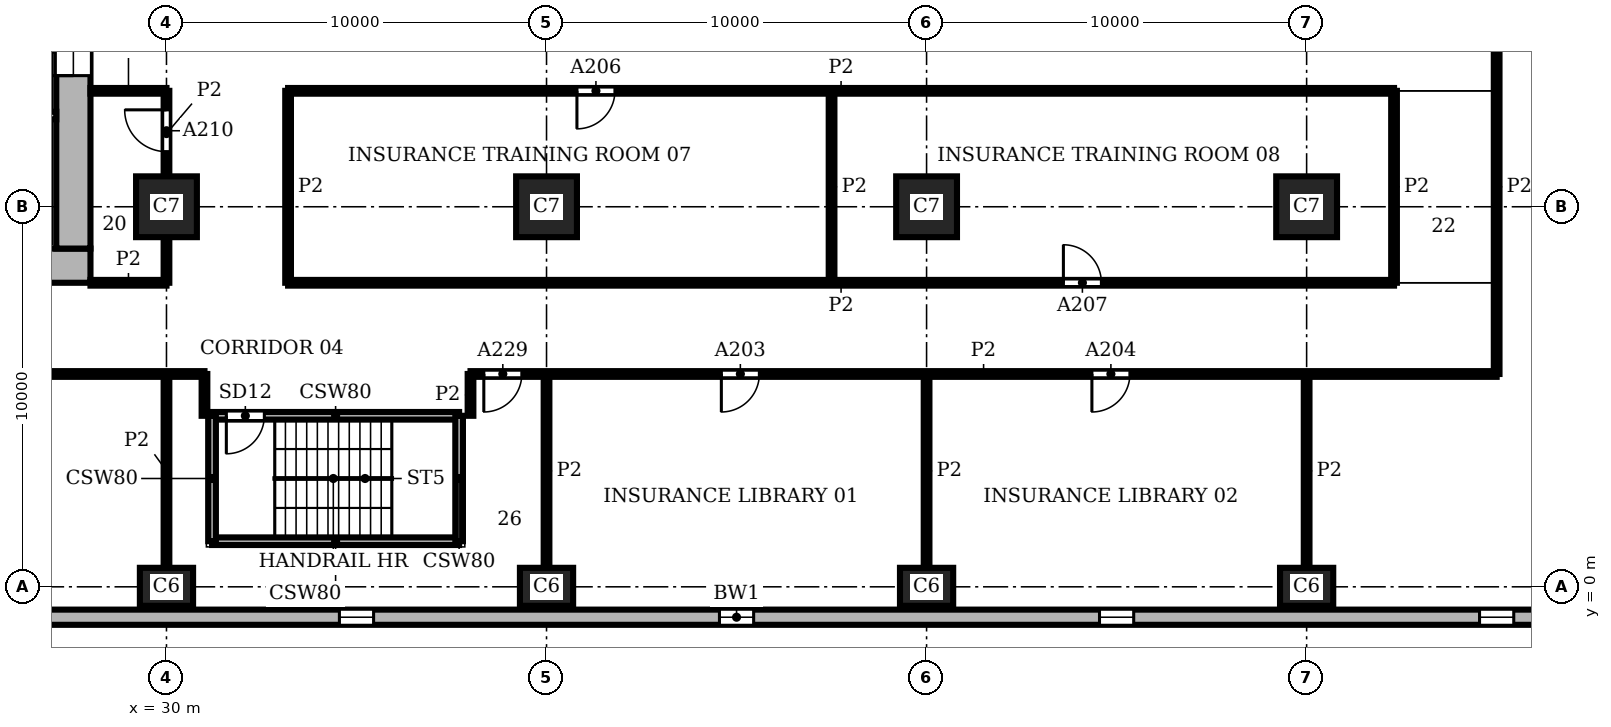
"""IFC4 building model, lengths in metres.
Left out: names, types, materials, properties, quantities, classifications, styles, units other than length and angle.
Written with IfcOpenShell. Run it as: python <this file> out.ifc"""

import sys

from ifc_helpers import new_model, si_unit, direction, frame, frame_2d, origin, origin_2d, place, context, subcontext, project, spatial, rectangle, extrude, element, fill, save


model = new_model("IFC4")
c1 = context("Model", 3, precision=1e-05, world=origin(), true_north=direction((0.0, 1.0)))
c2 = subcontext(c1, "Body", "Model", "MODEL_VIEW")
j1 = project(units=[si_unit("LENGTHUNIT", "METRE"), si_unit("PLANEANGLEUNIT", "RADIAN")], contexts=[c1])
p1 = place(None, origin())
s1 = spatial("IfcSite", under=j1, at=p1, CompositionType="ELEMENT")
p2 = place(p1, origin())
s2 = spatial("IfcBuilding", under=s1, at=p2, CompositionType="ELEMENT")
p3 = place(p2, frame((0.0, 0.0, 23.7)))
s3 = spatial("IfcBuildingStorey", under=s2, at=p3, CompositionType="ELEMENT", Elevation=23.7)
for number, where, z_axis, x_axis in (
    (1, (30.0, 0.0, 0.0), (0.0, 0.0, 1.0), (1.0, 0.0, 0.0)),
    (2, (40.0, 0.0, 0.0), (0.0, 0.0, 1.0), (1.0, 0.0, 0.0)),
    (3, (50.0, 0.0, 0.0), (0.0, 0.0, 1.0), (1.0, 0.0, 0.0)),
    (4, (60.0, 0.0, 0.0), (0.0, 0.0, 1.0), (1.0, 0.0, 0.0)),
):
    element("IfcColumn", number, at=place(p3, frame(where, z_axis=z_axis, x_axis=x_axis)), inside=s3, PredefinedType="COLUMN", context=c2, shape_type="SweptSolid", body=[
        extrude(rectangle(XDim=1.4, YDim=1.0, at=origin_2d()), origin(), (0.0, 0.0, 1.0), 3.9),
    ])
for number, where, z_axis, x_axis in (
    (5, (30.0, 10.0, 0.0), (0.0, 0.0, 1.0), (1.0, 0.0, 0.0)),
    (6, (40.0, 10.0, 0.0), (0.0, 0.0, 1.0), (1.0, 0.0, 0.0)),
    (7, (50.0, 10.0, 0.0), (0.0, 0.0, 1.0), (1.0, 0.0, 0.0)),
    (8, (60.0, 10.0, 0.0), (0.0, 0.0, 1.0), (1.0, 0.0, 0.0)),
):
    element("IfcColumn", number, at=place(p3, frame(where, z_axis=z_axis, x_axis=x_axis)), inside=s3, PredefinedType="COLUMN", context=c2, shape_type="SweptSolid", body=[
        extrude(rectangle(XDim=1.6, YDim=1.6, at=origin_2d()), origin(), (0.0, 0.0, 1.0), 3.9),
    ])
p4 = place(p3, frame((8.0, 8.45, 0.0), z_axis=(0.0, 0.0, 1.0), x_axis=(1.0, 0.0, 0.0)))
e9 = element("IfcWall", 9, at=p4, inside=s3, PredefinedType="SHEAR", context=c2, shape_type="SweptSolid", body=[
    extrude(rectangle(XDim=20.0, YDim=0.9, at=frame_2d((10.0, 0.0))), origin(), (0.0, 0.0, 1.0), 3.9),
])
p5 = place(p3, frame((27.55, 8.9, 0.0), z_axis=(0.0, 0.0, 1.0), x_axis=(0.0, 1.0, 0.0)))
e10 = element("IfcWall", 10, at=p5, inside=s3, PredefinedType="SHEAR", context=c2, shape_type="SweptSolid", body=[
    extrude(rectangle(XDim=18.2, YDim=0.9, at=frame_2d((9.1, 0.0))), origin(), (0.0, 0.0, 1.0), 3.9),
])
p6 = place(p5, frame((4.55, 0.0, 0.0)))
e11 = element("IfcOpeningElement", 11, at=p6, cuts=e10, PredefinedType="OPENING", context=c2, shape_type="SweptSolid", body=[
    extrude(rectangle(XDim=1.6, YDim=2.1, at=frame_2d((0.8, 1.05))), frame((0.0, 0.46, 0.0), z_axis=(0.0, -1.0, 0.0), x_axis=(1.0, 0.0, 0.0)), (0.0, 0.0, 1.0), 0.92),
])
p7 = place(p3, frame((20.8, -0.8, 0.0), z_axis=(0.0, 0.0, 1.0), x_axis=(1.0, 0.0, 0.0)))
e12 = element("IfcWall", 12, at=p7, inside=s3, PredefinedType="SOLIDWALL", context=c2, shape_type="SweptSolid", body=[
    extrude(rectangle(XDim=48.4, YDim=0.4, at=frame_2d((24.2, 0.0))), origin(), (0.0, 0.0, 1.0), 3.9),
])
p8 = place(p7, frame((3.75, 0.0, 0.9)))
e13 = element("IfcOpeningElement", 13, at=p8, cuts=e12, PredefinedType="OPENING", context=c2, shape_type="SweptSolid", body=[
    extrude(rectangle(XDim=0.9, YDim=2.35, at=frame_2d((0.45, 1.175))), frame((0.0, 0.21, 0.0), z_axis=(0.0, -1.0, 0.0), x_axis=(1.0, 0.0, 0.0)), (0.0, 0.0, 1.0), 0.42),
])
p9 = place(p7, frame((13.75, 0.0, 0.9)))
e14 = element("IfcOpeningElement", 14, at=p9, cuts=e12, PredefinedType="OPENING", context=c2, shape_type="SweptSolid", body=[
    extrude(rectangle(XDim=0.9, YDim=2.35, at=frame_2d((0.45, 1.175))), frame((0.0, 0.21, 0.0), z_axis=(0.0, -1.0, 0.0), x_axis=(1.0, 0.0, 0.0)), (0.0, 0.0, 1.0), 0.42),
])
p10 = place(p7, frame((23.75, 0.0, 0.9)))
e15 = element("IfcOpeningElement", 15, at=p10, cuts=e12, PredefinedType="OPENING", context=c2, shape_type="SweptSolid", body=[
    extrude(rectangle(XDim=0.9, YDim=2.35, at=frame_2d((0.45, 1.175))), frame((0.0, 0.21, 0.0), z_axis=(0.0, -1.0, 0.0), x_axis=(1.0, 0.0, 0.0)), (0.0, 0.0, 1.0), 0.42),
])
p11 = place(p7, frame((33.75, 0.0, 0.9)))
e16 = element("IfcOpeningElement", 16, at=p11, cuts=e12, PredefinedType="OPENING", context=c2, shape_type="SweptSolid", body=[
    extrude(rectangle(XDim=0.9, YDim=2.35, at=frame_2d((0.45, 1.175))), frame((0.0, 0.21, 0.0), z_axis=(0.0, -1.0, 0.0), x_axis=(1.0, 0.0, 0.0)), (0.0, 0.0, 1.0), 0.42),
])
p12 = place(p7, frame((43.75, 0.0, 0.9)))
e17 = element("IfcOpeningElement", 17, at=p12, cuts=e12, PredefinedType="OPENING", context=c2, shape_type="SweptSolid", body=[
    extrude(rectangle(XDim=0.9, YDim=2.35, at=frame_2d((0.45, 1.175))), frame((0.0, 0.21, 0.0), z_axis=(0.0, -1.0, 0.0), x_axis=(1.0, 0.0, 0.0)), (0.0, 0.0, 1.0), 0.42),
])
p13 = place(p3, frame((31.2, 1.2, 0.0), z_axis=(0.0, 0.0, 1.0), x_axis=(1.0, 0.0, 0.0)))
e18 = element("IfcWall", 18, at=p13, inside=s3, PredefinedType="SHEAR", context=c2, shape_type="SweptSolid", body=[
    extrude(rectangle(XDim=6.5, YDim=0.2, at=frame_2d((3.25, 0.0))), origin(), (0.0, 0.0, 1.0), 3.58),
])
p14 = place(p3, frame((31.2, 4.5, 0.0), z_axis=(0.0, 0.0, 1.0), x_axis=(1.0, 0.0, 0.0)))
e19 = element("IfcWall", 19, at=p14, inside=s3, PredefinedType="SHEAR", context=c2, shape_type="SweptSolid", body=[
    extrude(rectangle(XDim=6.5, YDim=0.2, at=frame_2d((3.25, 0.0))), origin(), (0.0, 0.0, 1.0), 3.58),
])
p15 = place(p14, frame((0.375, 0.0, 0.0)))
e20 = element("IfcOpeningElement", 20, at=p15, cuts=e19, PredefinedType="OPENING", context=c2, shape_type="SweptSolid", body=[
    extrude(rectangle(XDim=1.0, YDim=2.1, at=frame_2d((0.5, 1.05))), frame((0.0, 0.11, 0.0), z_axis=(0.0, -1.0, 0.0), x_axis=(1.0, 0.0, 0.0)), (0.0, 0.0, 1.0), 0.22),
])
p16 = place(p3, frame((13.8, 12.4, 0.0), z_axis=(0.0, 0.0, 1.0), x_axis=(1.0, 0.0, 0.0)))
e21 = element("IfcWall", 21, at=p16, inside=s3, PredefinedType="SHEAR", context=c2, shape_type="SweptSolid", body=[
    extrude(rectangle(XDim=13.3, YDim=0.2, at=frame_2d((6.65, 0.0))), origin(), (0.0, 0.0, 1.0), 3.58),
])
p17 = place(p16, frame((2.4, 0.0, 0.0)))
e22 = element("IfcOpeningElement", 22, at=p17, cuts=e21, PredefinedType="OPENING", context=c2, shape_type="SweptSolid", body=[
    extrude(rectangle(XDim=1.1, YDim=2.1, at=frame_2d((0.55, 1.05))), frame((0.0, 0.11, 0.0), z_axis=(0.0, -1.0, 0.0), x_axis=(1.0, 0.0, 0.0)), (0.0, 0.0, 1.0), 0.22),
])
p18 = place(p16, frame((4.9, 0.0, 0.0)))
e23 = element("IfcOpeningElement", 23, at=p18, cuts=e21, PredefinedType="OPENING", context=c2, shape_type="SweptSolid", body=[
    extrude(rectangle(XDim=1.1, YDim=2.1, at=frame_2d((0.55, 1.05))), frame((0.0, 0.11, 0.0), z_axis=(0.0, -1.0, 0.0), x_axis=(1.0, 0.0, 0.0)), (0.0, 0.0, 1.0), 0.22),
])
p19 = place(p16, frame((0.25, 0.0, 0.0)))
e24 = element("IfcOpeningElement", 24, at=p19, cuts=e21, PredefinedType="OPENING", context=c2, shape_type="SweptSolid", body=[
    extrude(rectangle(XDim=1.0, YDim=2.1, at=frame_2d((0.5, 1.05))), frame((0.0, 0.11, 0.0), z_axis=(0.0, -1.0, 0.0), x_axis=(1.0, 0.0, 0.0)), (0.0, 0.0, 1.0), 0.22),
])
for number, where, z_axis, x_axis in (
    (25, (31.2, 1.2, 0.0), (0.0, 0.0, 1.0), (0.0, 1.0, 0.0)),
    (26, (37.7, 1.2, 0.0), (0.0, 0.0, 1.0), (0.0, 1.0, 0.0)),
):
    element("IfcWall", number, at=place(p3, frame(where, z_axis=z_axis, x_axis=x_axis)), inside=s3, PredefinedType="SHEAR", context=c2, shape_type="SweptSolid", body=[
        extrude(rectangle(XDim=3.3, YDim=0.2, at=frame_2d((1.65, 0.0))), origin(), (0.0, 0.0, 1.0), 3.58),
    ])
p20 = place(p3, frame((30.0, 0.5, 0.0), z_axis=(0.0, 0.0, 1.0), x_axis=(0.0, 1.0, 0.0)))
e27 = element("IfcWall", 27, at=p20, inside=s3, PredefinedType="PARTITIONING", context=c2, shape_type="SweptSolid", body=[
    extrude(rectangle(XDim=5.1, YDim=0.15, at=frame_2d((2.55, 0.0))), origin(), (0.0, 0.0, 1.0), 3.58),
])
p21 = place(p3, frame((30.0, 8.0, 0.0), z_axis=(0.0, 0.0, 1.0), x_axis=(0.0, 1.0, 0.0)))
e28 = element("IfcWall", 28, at=p21, inside=s3, PredefinedType="PARTITIONING", context=c2, shape_type="SweptSolid", body=[
    extrude(rectangle(XDim=1.2, YDim=0.15, at=frame_2d((0.6, 0.0))), origin(), (0.0, 0.0, 1.0), 3.58),
])
p22 = place(p3, frame((30.0, 10.8, 0.0), z_axis=(0.0, 0.0, 1.0), x_axis=(0.0, 1.0, 0.0)))
e29 = element("IfcWall", 29, at=p22, inside=s3, PredefinedType="PARTITIONING", context=c2, shape_type="SweptSolid", body=[
    extrude(rectangle(XDim=2.25, YDim=0.15, at=frame_2d((1.125, 0.0))), origin(), (0.0, 0.0, 1.0), 3.58),
])
p23 = place(p22, frame((0.65, 0.0, 0.0)))
e30 = element("IfcOpeningElement", 30, at=p23, cuts=e29, PredefinedType="OPENING", context=c2, shape_type="SweptSolid", body=[
    extrude(rectangle(XDim=1.1, YDim=2.1, at=frame_2d((0.55, 1.05))), frame((0.0, 0.085, 0.0), z_axis=(0.0, -1.0, 0.0), x_axis=(1.0, 0.0, 0.0)), (0.0, 0.0, 1.0), 0.17),
])
p24 = place(p3, frame((31.0, 4.5, 0.0), z_axis=(0.0, 0.0, 1.0), x_axis=(0.0, 1.0, 0.0)))
e31 = element("IfcWall", 31, at=p24, inside=s3, PredefinedType="PARTITIONING", context=c2, shape_type="SweptSolid", body=[
    extrude(rectangle(XDim=1.1, YDim=0.15, at=frame_2d((0.55, 0.0))), origin(), (0.0, 0.0, 1.0), 3.58),
])
p25 = place(p3, frame((33.2, 8.0, 0.0), z_axis=(0.0, 0.0, 1.0), x_axis=(0.0, 1.0, 0.0)))
e32 = element("IfcWall", 32, at=p25, inside=s3, PredefinedType="PARTITIONING", context=c2, shape_type="SweptSolid", body=[
    extrude(rectangle(XDim=5.05, YDim=0.15, at=frame_2d((2.525, 0.0))), origin(), (0.0, 0.0, 1.0), 3.58),
])
p26 = place(p3, frame((38.0, 4.5, 0.0), z_axis=(0.0, 0.0, 1.0), x_axis=(0.0, 1.0, 0.0)))
e33 = element("IfcWall", 33, at=p26, inside=s3, PredefinedType="PARTITIONING", context=c2, shape_type="SweptSolid", body=[
    extrude(rectangle(XDim=1.1, YDim=0.15, at=frame_2d((0.55, 0.0))), origin(), (0.0, 0.0, 1.0), 3.58),
])
p27 = place(p3, frame((40.0, 0.5, 0.0), z_axis=(0.0, 0.0, 1.0), x_axis=(0.0, 1.0, 0.0)))
e34 = element("IfcWall", 34, at=p27, inside=s3, PredefinedType="PARTITIONING", context=c2, shape_type="SweptSolid", body=[
    extrude(rectangle(XDim=5.1, YDim=0.15, at=frame_2d((2.55, 0.0))), origin(), (0.0, 0.0, 1.0), 3.58),
])
p28 = place(p3, frame((47.5, 8.0, 0.0), z_axis=(0.0, 0.0, 1.0), x_axis=(0.0, 1.0, 0.0)))
e35 = element("IfcWall", 35, at=p28, inside=s3, PredefinedType="PARTITIONING", context=c2, shape_type="SweptSolid", body=[
    extrude(rectangle(XDim=5.05, YDim=0.15, at=frame_2d((2.525, 0.0))), origin(), (0.0, 0.0, 1.0), 3.58),
])
for number, where, z_axis, x_axis in (
    (36, (50.0, 0.5, 0.0), (0.0, 0.0, 1.0), (0.0, 1.0, 0.0)),
    (37, (60.0, 0.5, 0.0), (0.0, 0.0, 1.0), (0.0, 1.0, 0.0)),
):
    element("IfcWall", number, at=place(p3, frame(where, z_axis=z_axis, x_axis=x_axis)), inside=s3, PredefinedType="PARTITIONING", context=c2, shape_type="SweptSolid", body=[
        extrude(rectangle(XDim=5.1, YDim=0.15, at=frame_2d((2.55, 0.0))), origin(), (0.0, 0.0, 1.0), 3.58),
    ])
p29 = place(p3, frame((62.3, 8.0, 0.0), z_axis=(0.0, 0.0, 1.0), x_axis=(0.0, 1.0, 0.0)))
e38 = element("IfcWall", 38, at=p29, inside=s3, PredefinedType="PARTITIONING", context=c2, shape_type="SweptSolid", body=[
    extrude(rectangle(XDim=5.05, YDim=0.15, at=frame_2d((2.525, 0.0))), origin(), (0.0, 0.0, 1.0), 3.58),
])
p30 = place(p3, frame((65.0, 5.6, 0.0), z_axis=(0.0, 0.0, 1.0), x_axis=(0.0, 1.0, 0.0)))
e39 = element("IfcWall", 39, at=p30, inside=s3, PredefinedType="PARTITIONING", context=c2, shape_type="SweptSolid", body=[
    extrude(rectangle(XDim=9.85, YDim=0.15, at=frame_2d((4.925, 0.0))), origin(), (0.0, 0.0, 1.0), 3.58),
])
p31 = place(p3, frame((5.6, 5.6, 0.0), z_axis=(0.0, 0.0, 1.0), x_axis=(1.0, 0.0, 0.0)))
e40 = element("IfcWall", 40, at=p31, inside=s3, PredefinedType="PARTITIONING", context=c2, shape_type="SweptSolid", body=[
    extrude(rectangle(XDim=25.4, YDim=0.15, at=frame_2d((12.7, 0.0))), origin(), (0.0, 0.0, 1.0), 3.58),
])
p32 = place(p31, frame((4.1, 0.0, 0.0)))
e41 = element("IfcOpeningElement", 41, at=p32, cuts=e40, PredefinedType="OPENING", context=c2, shape_type="SweptSolid", body=[
    extrude(rectangle(XDim=1.0, YDim=2.1, at=frame_2d((0.5, 1.05))), frame((0.0, 0.085, 0.0), z_axis=(0.0, -1.0, 0.0), x_axis=(1.0, 0.0, 0.0)), (0.0, 0.0, 1.0), 0.17),
])
p33 = place(p31, frame((11.25, 0.0, 0.0)))
e42 = element("IfcOpeningElement", 42, at=p33, cuts=e40, PredefinedType="OPENING", context=c2, shape_type="SweptSolid", body=[
    extrude(rectangle(XDim=0.8, YDim=2.1, at=frame_2d((0.4, 1.05))), frame((0.0, 0.085, 0.0), z_axis=(0.0, -1.0, 0.0), x_axis=(1.0, 0.0, 0.0)), (0.0, 0.0, 1.0), 0.17),
])
p34 = place(p31, frame((19.25, 0.0, 0.0)))
e43 = element("IfcOpeningElement", 43, at=p34, cuts=e40, PredefinedType="OPENING", context=c2, shape_type="SweptSolid", body=[
    extrude(rectangle(XDim=1.0, YDim=2.1, at=frame_2d((0.5, 1.05))), frame((0.0, 0.085, 0.0), z_axis=(0.0, -1.0, 0.0), x_axis=(1.0, 0.0, 0.0)), (0.0, 0.0, 1.0), 0.17),
])
p35 = place(p3, frame((38.0, 5.6, 0.0), z_axis=(0.0, 0.0, 1.0), x_axis=(1.0, 0.0, 0.0)))
e44 = element("IfcWall", 44, at=p35, inside=s3, PredefinedType="PARTITIONING", context=c2, shape_type="SweptSolid", body=[
    extrude(rectangle(XDim=27.0, YDim=0.15, at=frame_2d((13.5, 0.0))), origin(), (0.0, 0.0, 1.0), 3.58),
])
p36 = place(p35, frame((6.6, 0.0, 0.0)))
e45 = element("IfcOpeningElement", 45, at=p36, cuts=e44, PredefinedType="OPENING", context=c2, shape_type="SweptSolid", body=[
    extrude(rectangle(XDim=1.0, YDim=2.1, at=frame_2d((0.5, 1.05))), frame((0.0, 0.085, 0.0), z_axis=(0.0, -1.0, 0.0), x_axis=(1.0, 0.0, 0.0)), (0.0, 0.0, 1.0), 0.17),
])
p37 = place(p35, frame((16.35, 0.0, 0.0)))
e46 = element("IfcOpeningElement", 46, at=p37, cuts=e44, PredefinedType="OPENING", context=c2, shape_type="SweptSolid", body=[
    extrude(rectangle(XDim=1.0, YDim=2.1, at=frame_2d((0.5, 1.05))), frame((0.0, 0.085, 0.0), z_axis=(0.0, -1.0, 0.0), x_axis=(1.0, 0.0, 0.0)), (0.0, 0.0, 1.0), 0.17),
])
p38 = place(p35, frame((0.35, 0.0, 0.0)))
e47 = element("IfcOpeningElement", 47, at=p38, cuts=e44, PredefinedType="OPENING", context=c2, shape_type="SweptSolid", body=[
    extrude(rectangle(XDim=1.0, YDim=2.1, at=frame_2d((0.5, 1.05))), frame((0.0, 0.085, 0.0), z_axis=(0.0, -1.0, 0.0), x_axis=(1.0, 0.0, 0.0)), (0.0, 0.0, 1.0), 0.17),
])
p39 = place(p3, frame((28.0, 8.0, 0.0), z_axis=(0.0, 0.0, 1.0), x_axis=(1.0, 0.0, 0.0)))
e48 = element("IfcWall", 48, at=p39, inside=s3, PredefinedType="PARTITIONING", context=c2, shape_type="SweptSolid", body=[
    extrude(rectangle(XDim=2.0, YDim=0.15, at=frame_2d((1.0, 0.0))), origin(), (0.0, 0.0, 1.0), 3.58),
])
p40 = place(p3, frame((33.2, 8.0, 0.0), z_axis=(0.0, 0.0, 1.0), x_axis=(1.0, 0.0, 0.0)))
e49 = element("IfcWall", 49, at=p40, inside=s3, PredefinedType="PARTITIONING", context=c2, shape_type="SweptSolid", body=[
    extrude(rectangle(XDim=29.1, YDim=0.15, at=frame_2d((14.55, 0.0))), origin(), (0.0, 0.0, 1.0), 3.58),
])
p41 = place(p40, frame((20.4, 0.0, 0.0)))
e50 = element("IfcOpeningElement", 50, at=p41, cuts=e49, PredefinedType="OPENING", context=c2, shape_type="SweptSolid", body=[
    extrude(rectangle(XDim=1.0, YDim=2.1, at=frame_2d((0.5, 1.05))), frame((0.0, 0.085, 0.0), z_axis=(0.0, -1.0, 0.0), x_axis=(1.0, 0.0, 0.0)), (0.0, 0.0, 1.0), 0.17),
])
p42 = place(p3, frame((28.0, 13.05, 0.0), z_axis=(0.0, 0.0, 1.0), x_axis=(1.0, 0.0, 0.0)))
e51 = element("IfcWall", 51, at=p42, inside=s3, PredefinedType="PARTITIONING", context=c2, shape_type="SweptSolid", body=[
    extrude(rectangle(XDim=2.0, YDim=0.15, at=frame_2d((1.0, 0.0))), origin(), (0.0, 0.0, 1.0), 3.58),
])
p43 = place(p3, frame((33.2, 13.05, 0.0), z_axis=(0.0, 0.0, 1.0), x_axis=(1.0, 0.0, 0.0)))
e52 = element("IfcWall", 52, at=p43, inside=s3, PredefinedType="PARTITIONING", context=c2, shape_type="SweptSolid", body=[
    extrude(rectangle(XDim=29.1, YDim=0.15, at=frame_2d((14.55, 0.0))), origin(), (0.0, 0.0, 1.0), 3.58),
])
p44 = place(p43, frame((7.6, 0.0, 0.0)))
e53 = element("IfcOpeningElement", 53, at=p44, cuts=e52, PredefinedType="OPENING", context=c2, shape_type="SweptSolid", body=[
    extrude(rectangle(XDim=1.0, YDim=2.1, at=frame_2d((0.5, 1.05))), frame((0.0, 0.085, 0.0), z_axis=(0.0, -1.0, 0.0), x_axis=(1.0, 0.0, 0.0)), (0.0, 0.0, 1.0), 0.17),
])
p45 = place(p9, origin())
e54 = element("IfcWindow", 54, at=p45, inside=s3, PartitioningType="SINGLE_PANEL", PredefinedType="WINDOW", context=c2, shape_type="SweptSolid", body=[
    extrude(rectangle(XDim=0.9, YDim=2.35, at=frame_2d((0.45, 1.175))), frame((0.0, 0.16, 0.0), z_axis=(0.0, -1.0, 0.0), x_axis=(1.0, 0.0, 0.0)), (0.0, 0.0, 1.0), 0.06),
])
fill(e14, e54)
p46 = place(p10, origin())
e55 = element("IfcWindow", 55, at=p46, inside=s3, PartitioningType="SINGLE_PANEL", PredefinedType="WINDOW", context=c2, shape_type="SweptSolid", body=[
    extrude(rectangle(XDim=0.9, YDim=2.35, at=frame_2d((0.45, 1.175))), frame((0.0, 0.16, 0.0), z_axis=(0.0, -1.0, 0.0), x_axis=(1.0, 0.0, 0.0)), (0.0, 0.0, 1.0), 0.06),
])
fill(e15, e55)
p47 = place(p11, origin())
e56 = element("IfcWindow", 56, at=p47, inside=s3, PartitioningType="SINGLE_PANEL", PredefinedType="WINDOW", context=c2, shape_type="SweptSolid", body=[
    extrude(rectangle(XDim=0.9, YDim=2.35, at=frame_2d((0.45, 1.175))), frame((0.0, 0.16, 0.0), z_axis=(0.0, -1.0, 0.0), x_axis=(1.0, 0.0, 0.0)), (0.0, 0.0, 1.0), 0.06),
])
fill(e16, e56)
p48 = place(p12, origin())
e57 = element("IfcWindow", 57, at=p48, inside=s3, PartitioningType="SINGLE_PANEL", PredefinedType="WINDOW", context=c2, shape_type="SweptSolid", body=[
    extrude(rectangle(XDim=0.9, YDim=2.35, at=frame_2d((0.45, 1.175))), frame((0.0, 0.16, 0.0), z_axis=(0.0, -1.0, 0.0), x_axis=(1.0, 0.0, 0.0)), (0.0, 0.0, 1.0), 0.06),
])
fill(e17, e57)
p49 = place(p15, frame((1.0, 0.0, 0.0), z_axis=(0.0, 0.0, 1.0), x_axis=(-1.0, 0.0, 0.0)))
e58 = element("IfcDoor", 58, at=p49, inside=s3, OperationType="SINGLE_SWING_RIGHT", PredefinedType="DOOR", context=c2, shape_type="SweptSolid", body=[
    extrude(rectangle(XDim=1.0, YDim=2.1, at=frame_2d((0.5, 1.05))), frame((0.0, 0.025, 0.0), z_axis=(0.0, -1.0, 0.0), x_axis=(1.0, 0.0, 0.0)), (0.0, 0.0, 1.0), 0.05),
])
fill(e20, e58)
p50 = place(p6, origin())
e59 = element("IfcDoor", 59, at=p50, inside=s3, OperationType="DOUBLE_DOOR_SINGLE_SWING", PredefinedType="DOOR", context=c2, shape_type="SweptSolid", body=[
    extrude(rectangle(XDim=1.6, YDim=2.1, at=frame_2d((0.8, 1.05))), frame((0.0, 0.025, 0.0), z_axis=(0.0, -1.0, 0.0), x_axis=(1.0, 0.0, 0.0)), (0.0, 0.0, 1.0), 0.05),
])
fill(e11, e59)
p51 = place(p36, frame((1.0, 0.0, 0.0), z_axis=(0.0, 0.0, 1.0), x_axis=(-1.0, 0.0, 0.0)))
e60 = element("IfcDoor", 60, at=p51, inside=s3, OperationType="SINGLE_SWING_RIGHT", PredefinedType="DOOR", context=c2, shape_type="SweptSolid", body=[
    extrude(rectangle(XDim=1.0, YDim=2.1, at=frame_2d((0.5, 1.05))), frame((0.0, 0.025, 0.0), z_axis=(0.0, -1.0, 0.0), x_axis=(1.0, 0.0, 0.0)), (0.0, 0.0, 1.0), 0.05),
])
fill(e45, e60)
p52 = place(p37, frame((1.0, 0.0, 0.0), z_axis=(0.0, 0.0, 1.0), x_axis=(-1.0, 0.0, 0.0)))
e61 = element("IfcDoor", 61, at=p52, inside=s3, OperationType="SINGLE_SWING_RIGHT", PredefinedType="DOOR", context=c2, shape_type="SweptSolid", body=[
    extrude(rectangle(XDim=1.0, YDim=2.1, at=frame_2d((0.5, 1.05))), frame((0.0, 0.025, 0.0), z_axis=(0.0, -1.0, 0.0), x_axis=(1.0, 0.0, 0.0)), (0.0, 0.0, 1.0), 0.05),
])
fill(e46, e61)
p53 = place(p44, frame((1.0, 0.0, 0.0), z_axis=(0.0, 0.0, 1.0), x_axis=(-1.0, 0.0, 0.0)))
e62 = element("IfcDoor", 62, at=p53, inside=s3, OperationType="SINGLE_SWING_RIGHT", PredefinedType="DOOR", context=c2, shape_type="SweptSolid", body=[
    extrude(rectangle(XDim=1.0, YDim=2.1, at=frame_2d((0.5, 1.05))), frame((0.0, 0.025, 0.0), z_axis=(0.0, -1.0, 0.0), x_axis=(1.0, 0.0, 0.0)), (0.0, 0.0, 1.0), 0.05),
])
fill(e53, e62)
p54 = place(p41, origin())
e63 = element("IfcDoor", 63, at=p54, inside=s3, OperationType="SINGLE_SWING_LEFT", PredefinedType="DOOR", context=c2, shape_type="SweptSolid", body=[
    extrude(rectangle(XDim=1.0, YDim=2.1, at=frame_2d((0.5, 1.05))), frame((0.0, 0.025, 0.0), z_axis=(0.0, -1.0, 0.0), x_axis=(1.0, 0.0, 0.0)), (0.0, 0.0, 1.0), 0.05),
])
fill(e50, e63)
p55 = place(p23, origin())
e64 = element("IfcDoor", 64, at=p55, inside=s3, OperationType="SINGLE_SWING_RIGHT", PredefinedType="DOOR", context=c2, shape_type="SweptSolid", body=[
    extrude(rectangle(XDim=1.1, YDim=2.1, at=frame_2d((0.55, 1.05))), frame((0.0, 0.025, 0.0), z_axis=(0.0, -1.0, 0.0), x_axis=(1.0, 0.0, 0.0)), (0.0, 0.0, 1.0), 0.05),
])
fill(e30, e64)
p56 = place(p38, frame((1.0, 0.0, 0.0), z_axis=(0.0, 0.0, 1.0), x_axis=(-1.0, 0.0, 0.0)))
e65 = element("IfcDoor", 65, at=p56, inside=s3, OperationType="SINGLE_SWING_RIGHT", PredefinedType="DOOR", context=c2, shape_type="SweptSolid", body=[
    extrude(rectangle(XDim=1.0, YDim=2.1, at=frame_2d((0.5, 1.05))), frame((0.0, 0.025, 0.0), z_axis=(0.0, -1.0, 0.0), x_axis=(1.0, 0.0, 0.0)), (0.0, 0.0, 1.0), 0.05),
])
fill(e47, e65)
save(model, sys.argv[1])
